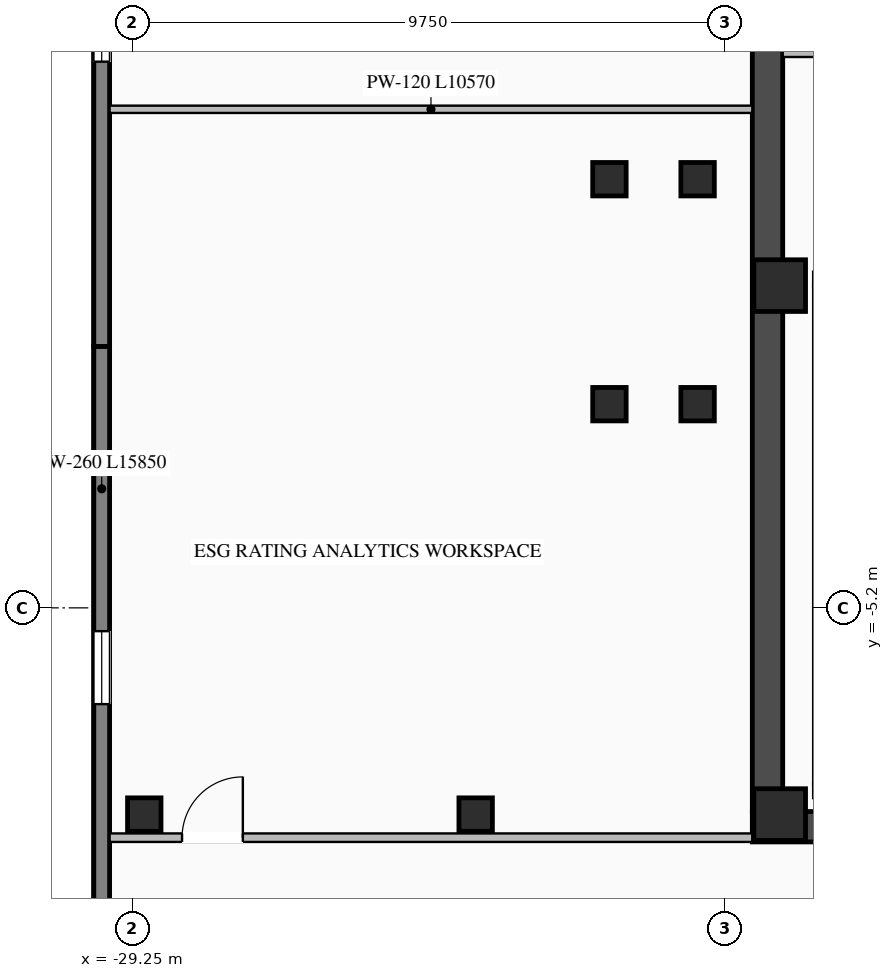
"""IFC4 building model, lengths in metres.
Left out: names, types, materials, properties, quantities, classifications, styles, units other than length and angle.
Written with IfcOpenShell. Run it as: python <this file> out.ifc"""

import sys

from ifc_helpers import new_model, si_unit, direction, frame, frame_2d, origin, origin_2d, place, context, subcontext, project, spatial, rectangle, i_section, extrude, element, fill, save


model = new_model("IFC4")
c1 = context("Model", 3, precision=1e-05, world=origin(), true_north=direction((0.0, 1.0)))
c2 = subcontext(c1, "Body", "Model", "MODEL_VIEW")
j1 = project(units=[si_unit("LENGTHUNIT", "METRE"), si_unit("PLANEANGLEUNIT", "RADIAN")], contexts=[c1])
p1 = place(None, origin())
s1 = spatial("IfcSite", under=j1, at=p1, CompositionType="ELEMENT")
p2 = place(p1, origin())
s2 = spatial("IfcBuilding", under=s1, at=p2, CompositionType="ELEMENT")
p3 = place(p2, frame((0.0, 0.0, 208.5)))
s3 = spatial("IfcBuildingStorey", under=s2, at=p3, CompositionType="ELEMENT", Elevation=208.5)
p4 = place(p3, frame((-19.05, -8.8, 0.0), z_axis=(0.0, 0.0, 1.0), x_axis=(1.0, 0.0, 0.0)))
e1 = element("IfcWall", 1, at=p4, inside=s3, PredefinedType="SHEAR", context=c2, shape_type="SweptSolid", body=[
    extrude(rectangle(XDim=10.25, YDim=0.5, at=frame_2d((5.125, 0.0))), origin(), (0.0, 0.0, 1.0), 3.27),
])
p5 = place(p3, frame((-18.8, -8.55, 0.0), z_axis=(0.0, 0.0, 1.0), x_axis=(0.0, 1.0, 0.0)))
e2 = element("IfcWall", 2, at=p5, inside=s3, PredefinedType="SHEAR", context=c2, shape_type="SweptSolid", body=[
    extrude(rectangle(XDim=17.1, YDim=0.5, at=frame_2d((8.55, 0.0))), origin(), (0.0, 0.0, 1.0), 3.27),
])
for number, where, z_axis, x_axis in (
    (3, (-18.6, -8.6, 0.0), (0.0, 0.0, 1.0), (1.0, 0.0, 0.0)),
    (4, (-18.6, 0.1, 0.0), (0.0, 0.0, 1.0), (1.0, 0.0, 0.0)),
):
    element("IfcColumn", number, at=place(p3, frame(where, z_axis=z_axis, x_axis=x_axis)), inside=s3, PredefinedType="COLUMN", context=c2, shape_type="SweptSolid", body=[
        extrude(rectangle(XDim=0.85, YDim=0.85, at=origin_2d()), origin(), (0.0, 0.0, 1.0), 3.45),
    ])
for number, where, z_axis, x_axis in (
    (5, (-21.4, -1.85, 0.0), (0.0, 0.0, 1.0), (1.0, 0.0, 0.0)),
    (6, (-21.4, 1.85, 0.0), (0.0, 0.0, 1.0), (1.0, 0.0, 0.0)),
    (7, (-19.95, -1.85, 0.0), (0.0, 0.0, 1.0), (1.0, 0.0, 0.0)),
    (8, (-19.95, 1.85, 0.0), (0.0, 0.0, 1.0), (1.0, 0.0, 0.0)),
    (9, (-23.6, -8.6, 0.0), (0.0, 0.0, 1.0), (1.0, 0.0, 0.0)),
    (10, (-29.05, -8.6, 0.0), (0.0, 0.0, 1.0), (1.0, 0.0, 0.0)),
):
    element("IfcColumn", number, at=place(p3, frame(where, z_axis=z_axis, x_axis=x_axis)), inside=s3, PredefinedType="COLUMN", context=c2, shape_type="SweptSolid", body=[
        extrude(i_section(OverallWidth=0.55, OverallDepth=0.55, WebThickness=0.024, FlangeThickness=0.036, at=origin_2d()), origin(), (0.0, 0.0, 1.0), 3.45),
    ])
p6 = place(p3, frame((-29.75, -16.75, 0.0), z_axis=(0.0, 0.0, 1.0), x_axis=(0.0, 1.0, 0.0)))
e11 = element("IfcWall", 11, at=p6, inside=s3, PredefinedType="STANDARD", context=c2, shape_type="SweptSolid", body=[
    extrude(rectangle(XDim=15.85, YDim=0.26, at=frame_2d((7.925, 0.0))), origin(), (0.0, 0.0, 1.0), 3.25),
])
p7 = place(p6, frame((4.133, 0.0, 0.76)))
e12 = element("IfcOpeningElement", 12, at=p7, cuts=e11, PredefinedType="OPENING", context=c2, shape_type="SweptSolid", body=[
    extrude(rectangle(XDim=1.2, YDim=1.95, at=frame_2d((0.6, 0.975))), frame((0.0, 0.14, 0.0), z_axis=(0.0, -1.0, 0.0), x_axis=(1.0, 0.0, 0.0)), (0.0, 0.0, 1.0), 0.28),
])
p8 = place(p6, frame((9.967, 0.0, 0.76)))
e13 = element("IfcOpeningElement", 13, at=p8, cuts=e11, PredefinedType="OPENING", context=c2, shape_type="SweptSolid", body=[
    extrude(rectangle(XDim=1.2, YDim=1.95, at=frame_2d((0.6, 0.975))), frame((0.0, 0.14, 0.0), z_axis=(0.0, -1.0, 0.0), x_axis=(1.0, 0.0, 0.0)), (0.0, 0.0, 1.0), 0.28),
])
p9 = place(p3, frame((-29.75, -0.9, 0.0), z_axis=(0.0, 0.0, 1.0), x_axis=(0.0, 1.0, 0.0)))
e14 = element("IfcWall", 14, at=p9, inside=s3, PredefinedType="STANDARD", context=c2, shape_type="SweptSolid", body=[
    extrude(rectangle(XDim=15.85, YDim=0.26, at=frame_2d((7.925, 0.0))), origin(), (0.0, 0.0, 1.0), 3.25),
])
p10 = place(p9, frame((4.683, 0.0, 0.76)))
e15 = element("IfcOpeningElement", 15, at=p10, cuts=e14, PredefinedType="OPENING", context=c2, shape_type="SweptSolid", body=[
    extrude(rectangle(XDim=1.2, YDim=1.95, at=frame_2d((0.6, 0.975))), frame((0.0, 0.14, 0.0), z_axis=(0.0, -1.0, 0.0), x_axis=(1.0, 0.0, 0.0)), (0.0, 0.0, 1.0), 0.28),
])
p11 = place(p9, frame((10.517, 0.0, 0.76)))
e16 = element("IfcOpeningElement", 16, at=p11, cuts=e14, PredefinedType="OPENING", context=c2, shape_type="SweptSolid", body=[
    extrude(rectangle(XDim=1.2, YDim=1.95, at=frame_2d((0.6, 0.975))), frame((0.0, 0.14, 0.0), z_axis=(0.0, -1.0, 0.0), x_axis=(1.0, 0.0, 0.0)), (0.0, 0.0, 1.0), 0.28),
])
p12 = place(p3, frame((-18.55, 3.92, 0.0), z_axis=(0.0, 0.0, 1.0), x_axis=(1.0, 0.0, 0.0)))
e17 = element("IfcWall", 17, at=p12, inside=s3, PredefinedType="STANDARD", context=c2, shape_type="SweptSolid", body=[
    extrude(rectangle(XDim=4.65, YDim=0.12, at=frame_2d((2.325, 0.0))), origin(), (0.0, 0.0, 1.0), 3.25),
])
p13 = place(p3, frame((-29.62, -8.98, 0.0), z_axis=(0.0, 0.0, 1.0), x_axis=(1.0, 0.0, 0.0)))
e18 = element("IfcWall", 18, at=p13, inside=s3, PredefinedType="STANDARD", context=c2, shape_type="SweptSolid", body=[
    extrude(rectangle(XDim=10.57, YDim=0.14, at=frame_2d((5.285, 0.0))), origin(), (0.0, 0.0, 1.0), 3.25),
])
p14 = place(p13, frame((1.191, 0.0, 0.0)))
e19 = element("IfcOpeningElement", 19, at=p14, cuts=e18, PredefinedType="OPENING", context=c2, shape_type="SweptSolid", body=[
    extrude(rectangle(XDim=1.0, YDim=2.08, at=frame_2d((0.5, 1.04))), frame((0.0, 0.08, 0.0), z_axis=(0.0, -1.0, 0.0), x_axis=(1.0, 0.0, 0.0)), (0.0, 0.0, 1.0), 0.16),
])
p15 = place(p3, frame((-29.62, 3.0, 0.0), z_axis=(0.0, 0.0, 1.0), x_axis=(1.0, 0.0, 0.0)))
e20 = element("IfcWall", 20, at=p15, inside=s3, PredefinedType="STANDARD", context=c2, shape_type="SweptSolid", body=[
    extrude(rectangle(XDim=10.57, YDim=0.12, at=frame_2d((5.285, 0.0))), origin(), (0.0, 0.0, 1.0), 3.25),
])
p16 = place(p8, origin())
e21 = element("IfcWindow", 21, at=p16, inside=s3, PartitioningType="SINGLE_PANEL", PredefinedType="WINDOW", context=c2, shape_type="SweptSolid", body=[
    extrude(rectangle(XDim=1.2, YDim=1.95, at=frame_2d((0.6, 0.975))), frame((0.0, 0.03, 0.0), z_axis=(0.0, -1.0, 0.0), x_axis=(1.0, 0.0, 0.0)), (0.0, 0.0, 1.0), 0.06),
])
fill(e13, e21)
p17 = place(p10, origin())
e22 = element("IfcWindow", 22, at=p17, inside=s3, PartitioningType="SINGLE_PANEL", PredefinedType="WINDOW", context=c2, shape_type="SweptSolid", body=[
    extrude(rectangle(XDim=1.2, YDim=1.95, at=frame_2d((0.6, 0.975))), frame((0.0, 0.03, 0.0), z_axis=(0.0, -1.0, 0.0), x_axis=(1.0, 0.0, 0.0)), (0.0, 0.0, 1.0), 0.06),
])
fill(e15, e22)
p18 = place(p14, origin())
e23 = element("IfcDoor", 23, at=p18, inside=s3, OperationType="SINGLE_SWING_RIGHT", PredefinedType="DOOR", context=c2, shape_type="SweptSolid", body=[
    extrude(rectangle(XDim=1.0, YDim=2.08, at=frame_2d((0.5, 1.04))), frame((0.0, 0.025, 0.0), z_axis=(0.0, -1.0, 0.0), x_axis=(1.0, 0.0, 0.0)), (0.0, 0.0, 1.0), 0.05),
])
fill(e19, e23)
save(model, sys.argv[1])
